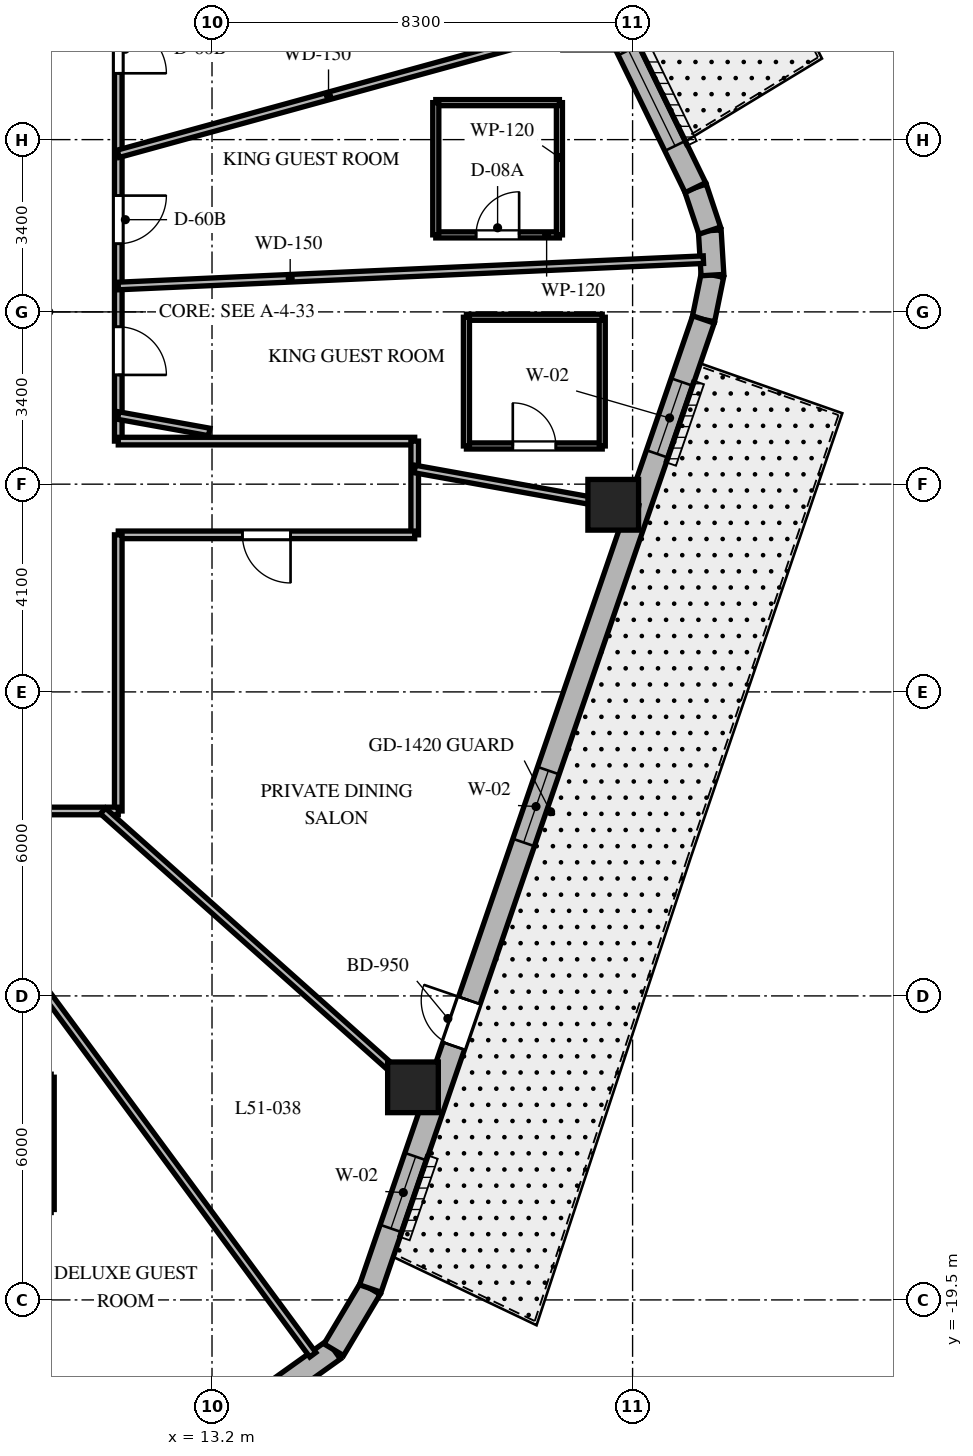
"""IFC4 building model, lengths in metres.
Left out: names, types, materials, properties, quantities, classifications, styles, units other than length and angle.
Written with IfcOpenShell. Run it as: python <this file> out.ifc"""

import sys

from ifc_helpers import new_model, si_unit, direction, frame, frame_2d, origin, origin_2d, place, context, subcontext, project, spatial, rectangle, extrude, element, fill, save


model = new_model("IFC4")
c1 = context("Model", 3, precision=1e-05, world=origin(), true_north=direction((0.0, 1.0)))
c2 = subcontext(c1, "Body", "Model", "MODEL_VIEW")
j1 = project(units=[si_unit("LENGTHUNIT", "METRE"), si_unit("PLANEANGLEUNIT", "RADIAN")], contexts=[c1])
p1 = place(None, origin())
s1 = spatial("IfcSite", under=j1, at=p1, CompositionType="ELEMENT")
p2 = place(p1, origin())
s2 = spatial("IfcBuilding", under=s1, at=p2, CompositionType="ELEMENT")
p3 = place(p2, frame((0.0, 0.0, 206.5)))
s3 = spatial("IfcBuildingStorey", under=s2, at=p3, CompositionType="ELEMENT", Elevation=206.5)
for number, where, z_axis, x_axis in (
    (1, (17.166, -15.304, 0.0), (0.0, 0.0, 1.0), (1.0, 0.0, 0.0)),
    (2, (21.118, -3.807, 0.0), (0.0, 0.0, 1.0), (1.0, 0.0, 0.0)),
):
    element("IfcColumn", number, at=place(p3, frame(where, z_axis=z_axis, x_axis=x_axis)), inside=s3, PredefinedType="COLUMN", context=c2, shape_type="SweptSolid", body=[
        extrude(rectangle(XDim=1.0, YDim=1.0, at=origin_2d()), origin(), (0.0, 0.0, 1.0), 3.8),
    ])
p4 = place(p3, frame((14.478, -21.287, 0.0), z_axis=(0.0, 0.0, 1.0), x_axis=(0.813888518617, 0.58102106611, 0.0)))
e3 = element("IfcWall", 3, at=p4, inside=s3, PredefinedType="SOLIDWALL", context=c2, shape_type="SweptSolid", body=[
    extrude(rectangle(XDim=1.383, YDim=0.45, at=frame_2d((0.691, 0.0))), origin(), (0.0, 0.0, 1.0), 3.5),
])
p5 = place(p3, frame((15.604, -20.483, 0.0), z_axis=(0.0, 0.0, 1.0), x_axis=(0.512222149036, 0.858852996756, 0.0)))
e4 = element("IfcWall", 4, at=p5, inside=s3, PredefinedType="SOLIDWALL", context=c2, shape_type="SweptSolid", body=[
    extrude(rectangle(XDim=1.406, YDim=0.45, at=frame_2d((0.703, 0.0))), origin(), (0.0, 0.0, 1.0), 3.5),
])
p6 = place(p3, frame((22.898, -0.15, 0.0), z_axis=(0.0, 0.0, 1.0), x_axis=(0.199055826889, 0.979988151858, 0.0)))
e5 = element("IfcWall", 5, at=p6, inside=s3, PredefinedType="SOLIDWALL", context=c2, shape_type="SweptSolid", body=[
    extrude(rectangle(XDim=0.894, YDim=0.45, at=frame_2d((0.447, 0.0))), origin(), (0.0, 0.0, 1.0), 3.5),
])
p7 = place(p3, frame((23.076, 0.727, 0.0), z_axis=(0.0, 0.0, 1.0), x_axis=(-0.060805222108, 0.998149650586, 0.0)))
e6 = element("IfcWall", 6, at=p7, inside=s3, PredefinedType="SOLIDWALL", context=c2, shape_type="SweptSolid", body=[
    extrude(rectangle(XDim=0.879, YDim=0.45, at=frame_2d((0.44, 0.0))), origin(), (0.0, 0.0, 1.0), 3.5),
])
p8 = place(p3, frame((23.023, 1.604, 0.0), z_axis=(0.0, 0.0, 1.0), x_axis=(-0.316801227695, 0.948491951537, 0.0)))
e7 = element("IfcWall", 7, at=p8, inside=s3, PredefinedType="SOLIDWALL", context=c2, shape_type="SweptSolid", body=[
    extrude(rectangle(XDim=0.894, YDim=0.45, at=frame_2d((0.447, 0.0))), origin(), (0.0, 0.0, 1.0), 3.5),
])
p9 = place(p3, frame((16.324, -19.275, 0.0), z_axis=(0.0, 0.0, 1.0), x_axis=(0.325083142304, 0.945685439557, 0.0)))
e8 = element("IfcWall", 8, at=p9, inside=s3, PredefinedType="SOLIDWALL", context=c2, shape_type="SweptSolid", body=[
    extrude(rectangle(XDim=20.224, YDim=0.45, at=frame_2d((10.112, 0.0))), origin(), (0.0, 0.0, 1.0), 3.5),
])
p10 = place(p9, frame((5.062, 0.0, 0.0)))
e9 = element("IfcOpeningElement", 9, at=p10, cuts=e8, PredefinedType="OPENING", context=c2, shape_type="SweptSolid", body=[
    extrude(rectangle(XDim=0.95, YDim=2.15, at=frame_2d((0.475, 1.075))), frame((0.0, 0.235, 0.0), z_axis=(0.0, -1.0, 0.0), x_axis=(1.0, 0.0, 0.0)), (0.0, 0.0, 1.0), 0.47),
])
p11 = place(p9, frame((1.253, 0.0, 0.8)))
e10 = element("IfcOpeningElement", 10, at=p11, cuts=e8, PredefinedType="OPENING", context=c2, shape_type="SweptSolid", body=[
    extrude(rectangle(XDim=1.5, YDim=1.8, at=frame_2d((0.75, 0.9))), frame((0.0, 0.235, 0.0), z_axis=(0.0, -1.0, 0.0), x_axis=(1.0, 0.0, 0.0)), (0.0, 0.0, 1.0), 0.47),
])
p12 = place(p9, frame((9.309, 0.0, 0.8)))
e11 = element("IfcOpeningElement", 11, at=p12, cuts=e8, PredefinedType="OPENING", context=c2, shape_type="SweptSolid", body=[
    extrude(rectangle(XDim=1.5, YDim=1.8, at=frame_2d((0.75, 0.9))), frame((0.0, 0.235, 0.0), z_axis=(0.0, -1.0, 0.0), x_axis=(1.0, 0.0, 0.0)), (0.0, 0.0, 1.0), 0.47),
])
p13 = place(p9, frame((17.418, 0.0, 0.8)))
e12 = element("IfcOpeningElement", 12, at=p13, cuts=e8, PredefinedType="OPENING", context=c2, shape_type="SweptSolid", body=[
    extrude(rectangle(XDim=1.5, YDim=1.8, at=frame_2d((0.75, 0.9))), frame((0.0, 0.235, 0.0), z_axis=(0.0, -1.0, 0.0), x_axis=(1.0, 0.0, 0.0)), (0.0, 0.0, 1.0), 0.47),
])
p14 = place(p3, frame((22.74, 2.452, 0.0), z_axis=(0.0, 0.0, 1.0), x_axis=(-0.437753424814, 0.899095066755, 0.0)))
e13 = element("IfcWall", 13, at=p14, inside=s3, PredefinedType="SOLIDWALL", context=c2, shape_type="SweptSolid", body=[
    extrude(rectangle(XDim=19.137, YDim=0.45, at=frame_2d((9.569, 0.0))), origin(), (0.0, 0.0, 1.0), 3.5),
])
p15 = place(p14, frame((4.763, 0.0, 0.0)))
e14 = element("IfcOpeningElement", 14, at=p15, cuts=e13, PredefinedType="OPENING", context=c2, shape_type="SweptSolid", body=[
    extrude(rectangle(XDim=1.0, YDim=2.15, at=frame_2d((0.5, 1.075))), frame((0.0, 0.235, 0.0), z_axis=(0.0, -1.0, 0.0), x_axis=(1.0, 0.0, 0.0)), (0.0, 0.0, 1.0), 0.47),
])
p16 = place(p14, frame((0.916, 0.0, 0.8)))
e15 = element("IfcOpeningElement", 15, at=p16, cuts=e13, PredefinedType="OPENING", context=c2, shape_type="SweptSolid", body=[
    extrude(rectangle(XDim=2.1, YDim=1.85, at=frame_2d((1.05, 0.925))), frame((0.0, 0.235, 0.0), z_axis=(0.0, -1.0, 0.0), x_axis=(1.0, 0.0, 0.0)), (0.0, 0.0, 1.0), 0.47),
])
p17 = place(p14, frame((6.851, 0.0, 0.8)))
e16 = element("IfcOpeningElement", 16, at=p17, cuts=e13, PredefinedType="OPENING", context=c2, shape_type="SweptSolid", body=[
    extrude(rectangle(XDim=2.1, YDim=1.85, at=frame_2d((1.05, 0.925))), frame((0.0, 0.235, 0.0), z_axis=(0.0, -1.0, 0.0), x_axis=(1.0, 0.0, 0.0)), (0.0, 0.0, 1.0), 0.47),
])
p18 = place(p14, frame((11.545, 0.0, 0.8)))
e17 = element("IfcOpeningElement", 17, at=p18, cuts=e13, PredefinedType="OPENING", context=c2, shape_type="SweptSolid", body=[
    extrude(rectangle(XDim=2.1, YDim=1.85, at=frame_2d((1.05, 0.925))), frame((0.0, 0.235, 0.0), z_axis=(0.0, -1.0, 0.0), x_axis=(1.0, 0.0, 0.0)), (0.0, 0.0, 1.0), 0.47),
])
p19 = place(p14, frame((16.173, 0.0, 0.8)))
e18 = element("IfcOpeningElement", 18, at=p19, cuts=e13, PredefinedType="OPENING", context=c2, shape_type="SweptSolid", body=[
    extrude(rectangle(XDim=2.1, YDim=1.85, at=frame_2d((1.05, 0.925))), frame((0.0, 0.235, 0.0), z_axis=(0.0, -1.0, 0.0), x_axis=(1.0, 0.0, 0.0)), (0.0, 0.0, 1.0), 0.47),
])
p20 = place(p3, frame((11.35, 9.85, 0.0), z_axis=(0.0, 0.0, 1.0), x_axis=(0.0, -1.0, 0.0)))
e19 = element("IfcWall", 19, at=p20, inside=s3, PredefinedType="PARTITIONING", context=c2, shape_type="SweptSolid", body=[
    extrude(rectangle(XDim=12.4, YDim=0.15, at=frame_2d((6.2, 0.0))), origin(), (0.0, 0.0, 1.0), 2.99),
])
p21 = place(p20, frame((7.555, 0.0, 0.0)))
e20 = element("IfcOpeningElement", 20, at=p21, cuts=e19, PredefinedType="OPENING", context=c2, shape_type="SweptSolid", body=[
    extrude(rectangle(XDim=0.95, YDim=2.03, at=frame_2d((0.475, 1.015))), frame((0.0, 0.085, 0.0), z_axis=(0.0, -1.0, 0.0), x_axis=(1.0, 0.0, 0.0)), (0.0, 0.0, 1.0), 0.17),
])
p22 = place(p20, frame((4.191, 0.0, 0.0)))
e21 = element("IfcOpeningElement", 21, at=p22, cuts=e19, PredefinedType="OPENING", context=c2, shape_type="SweptSolid", body=[
    extrude(rectangle(XDim=0.95, YDim=2.03, at=frame_2d((0.475, 1.015))), frame((0.0, 0.085, 0.0), z_axis=(0.0, -1.0, 0.0), x_axis=(1.0, 0.0, 0.0)), (0.0, 0.0, 1.0), 0.17),
])
p23 = place(p20, frame((0.994, 0.0, 0.0)))
e22 = element("IfcOpeningElement", 22, at=p23, cuts=e19, PredefinedType="OPENING", context=c2, shape_type="SweptSolid", body=[
    extrude(rectangle(XDim=0.9, YDim=2.03, at=frame_2d((0.45, 1.015))), frame((0.0, 0.085, 0.0), z_axis=(0.0, -1.0, 0.0), x_axis=(1.0, 0.0, 0.0)), (0.0, 0.0, 1.0), 0.17),
])
p24 = place(p20, frame((10.144, 0.0, 0.0)))
e23 = element("IfcOpeningElement", 23, at=p24, cuts=e19, PredefinedType="OPENING", context=c2, shape_type="SweptSolid", body=[
    extrude(rectangle(XDim=0.95, YDim=2.03, at=frame_2d((0.475, 1.015))), frame((0.0, 0.085, 0.0), z_axis=(0.0, -1.0, 0.0), x_axis=(1.0, 0.0, 0.0)), (0.0, 0.0, 1.0), 0.17),
])
p25 = place(p3, frame((11.35, -2.55, 0.0), z_axis=(0.0, 0.0, 1.0), x_axis=(1.0, 0.0, 0.0)))
e24 = element("IfcWall", 24, at=p25, inside=s3, PredefinedType="PARTITIONING", context=c2, shape_type="SweptSolid", body=[
    extrude(rectangle(XDim=5.85, YDim=0.15, at=frame_2d((2.925, 0.0))), origin(), (0.0, 0.0, 1.0), 2.94),
])
p26 = place(p3, frame((17.2, -2.55, 0.0), z_axis=(0.0, 0.0, 1.0), x_axis=(0.0, -1.0, 0.0)))
e25 = element("IfcWall", 25, at=p26, inside=s3, PredefinedType="PARTITIONING", context=c2, shape_type="SweptSolid", body=[
    extrude(rectangle(XDim=1.85, YDim=0.15, at=frame_2d((0.925, 0.0))), origin(), (0.0, 0.0, 1.0), 2.94),
])
p27 = place(p3, frame((17.2, -4.4, 0.0), z_axis=(0.0, 0.0, 1.0), x_axis=(-1.0, 0.0, 0.0)))
e26 = element("IfcWall", 26, at=p27, inside=s3, PredefinedType="PARTITIONING", context=c2, shape_type="SweptSolid", body=[
    extrude(rectangle(XDim=5.85, YDim=0.15, at=frame_2d((2.925, 0.0))), origin(), (0.0, 0.0, 1.0), 2.94),
])
p28 = place(p27, frame((2.45, 0.0, 0.0)))
e27 = element("IfcOpeningElement", 27, at=p28, cuts=e26, PredefinedType="OPENING", context=c2, shape_type="SweptSolid", body=[
    extrude(rectangle(XDim=0.95, YDim=2.03, at=frame_2d((0.475, 1.015))), frame((0.0, 0.085, 0.0), z_axis=(0.0, -1.0, 0.0), x_axis=(1.0, 0.0, 0.0)), (0.0, 0.0, 1.0), 0.17),
])
p29 = place(p3, frame((11.35, -4.4, 0.0), z_axis=(0.0, 0.0, 1.0), x_axis=(0.0, -1.0, 0.0)))
e28 = element("IfcWall", 28, at=p29, inside=s3, PredefinedType="PARTITIONING", context=c2, shape_type="SweptSolid", body=[
    extrude(rectangle(XDim=5.45, YDim=0.15, at=frame_2d((2.725, 0.0))), origin(), (0.0, 0.0, 1.0), 2.99),
])
p30 = place(p3, frame((11.35, -9.85, 0.0), z_axis=(0.0, 0.0, 1.0), x_axis=(-1.0, 0.0, 0.0)))
e29 = element("IfcWall", 29, at=p30, inside=s3, PredefinedType="PARTITIONING", context=c2, shape_type="SweptSolid", body=[
    extrude(rectangle(XDim=10.43, YDim=0.15, at=frame_2d((5.215, 0.0))), origin(), (0.0, 0.0, 1.0), 2.99),
])
p31 = place(p30, frame((8.387, 0.0, 0.0)))
e30 = element("IfcOpeningElement", 30, at=p31, cuts=e29, PredefinedType="OPENING", context=c2, shape_type="SweptSolid", body=[
    extrude(rectangle(XDim=0.9, YDim=2.03, at=frame_2d((0.45, 1.015))), frame((0.0, 0.085, 0.0), z_axis=(0.0, -1.0, 0.0), x_axis=(1.0, 0.0, 0.0)), (0.0, 0.0, 1.0), 0.17),
])
p32 = place(p30, frame((5.287, 0.0, 0.0)))
e31 = element("IfcOpeningElement", 31, at=p32, cuts=e29, PredefinedType="OPENING", context=c2, shape_type="SweptSolid", body=[
    extrude(rectangle(XDim=0.95, YDim=2.03, at=frame_2d((0.475, 1.015))), frame((0.0, 0.085, 0.0), z_axis=(0.0, -1.0, 0.0), x_axis=(1.0, 0.0, 0.0)), (0.0, 0.0, 1.0), 0.17),
])
p33 = place(p30, frame((1.71, 0.0, 0.0)))
e32 = element("IfcOpeningElement", 32, at=p33, cuts=e29, PredefinedType="OPENING", context=c2, shape_type="SweptSolid", body=[
    extrude(rectangle(XDim=0.9, YDim=2.03, at=frame_2d((0.45, 1.015))), frame((0.0, 0.085, 0.0), z_axis=(0.0, -1.0, 0.0), x_axis=(1.0, 0.0, 0.0)), (0.0, 0.0, 1.0), 0.17),
])
p34 = place(p3, frame((11.35, 0.511, 0.0), z_axis=(0.0, 0.0, 1.0), x_axis=(0.998988518139, 0.044965994104, 0.0)))
e33 = element("IfcWall", 33, at=p34, inside=s3, PredefinedType="PARTITIONING", context=c2, shape_type="SweptSolid", body=[
    extrude(rectangle(XDim=11.559, YDim=0.15, at=frame_2d((5.78, 0.0))), origin(), (0.0, 0.0, 1.0), 2.74),
])
p35 = place(p3, frame((11.35, 3.121, 0.0), z_axis=(0.0, 0.0, 1.0), x_axis=(0.964212793822, 0.265129568758, 0.0)))
e34 = element("IfcWall", 34, at=p35, inside=s3, PredefinedType="PARTITIONING", context=c2, shape_type="SweptSolid", body=[
    extrude(rectangle(XDim=10.12, YDim=0.15, at=frame_2d((5.06, 0.0))), origin(), (0.0, 0.0, 1.0), 2.74),
])
p36 = place(p3, frame((7.269, -9.85, 0.0), z_axis=(0.0, 0.0, 1.0), x_axis=(0.593814492791, -0.8046019812, 0.0)))
e35 = element("IfcWall", 35, at=p36, inside=s3, PredefinedType="PARTITIONING", context=c2, shape_type="SweptSolid", body=[
    extrude(rectangle(XDim=13.338, YDim=0.15, at=frame_2d((6.669, 0.0))), origin(), (0.0, 0.0, 1.0), 2.74),
])
p37 = place(p3, frame((11.048, -9.85, 0.0), z_axis=(0.0, 0.0, 1.0), x_axis=(0.746444434655, -0.665447748492, 0.0)))
e36 = element("IfcWall", 36, at=p37, inside=s3, PredefinedType="PARTITIONING", context=c2, shape_type="SweptSolid", body=[
    extrude(rectangle(XDim=8.732, YDim=0.15, at=frame_2d((4.366, 0.0))), origin(), (0.0, 0.0, 1.0), 2.74),
])
p38 = place(p3, frame((11.35, -2.046, 0.0), z_axis=(0.0, 0.0, 1.0), x_axis=(0.984127783205, -0.177461281195, 0.0)))
e37 = element("IfcWall", 37, at=p38, inside=s3, PredefinedType="PARTITIONING", context=c2, shape_type="SweptSolid", body=[
    extrude(rectangle(XDim=1.826, YDim=0.15, at=frame_2d((0.913, 0.0))), origin(), (0.0, 0.0, 1.0), 3.5),
])
p39 = place(p3, frame((17.2, -3.101, 0.0), z_axis=(0.0, 0.0, 1.0), x_axis=(0.98413465883, -0.177423147559, 0.0)))
e38 = element("IfcWall", 38, at=p39, inside=s3, PredefinedType="PARTITIONING", context=c2, shape_type="SweptSolid", body=[
    extrude(rectangle(XDim=4.482, YDim=0.15, at=frame_2d((2.241, 0.0))), origin(), (0.0, 0.0, 1.0), 2.74),
])
p40 = place(p3, frame((17.616, 1.52, 0.0), z_axis=(0.0, 0.0, 1.0), x_axis=(1.0, 0.0, 0.0)))
e39 = element("IfcWall", 39, at=p40, inside=s3, PredefinedType="PARTITIONING", context=c2, shape_type="SweptSolid", body=[
    extrude(rectangle(XDim=2.44, YDim=0.12, at=frame_2d((1.22, 0.0))), origin(), (0.0, 0.0, 1.0), 3.5),
])
p41 = place(p40, frame((0.795, 0.0, 0.0)))
e40 = element("IfcOpeningElement", 40, at=p41, cuts=e39, PredefinedType="OPENING", context=c2, shape_type="SweptSolid", body=[
    extrude(rectangle(XDim=0.85, YDim=2.03, at=frame_2d((0.425, 1.015))), frame((0.0, 0.07, 0.0), z_axis=(0.0, -1.0, 0.0), x_axis=(1.0, 0.0, 0.0)), (0.0, 0.0, 1.0), 0.14),
])
p42 = place(p3, frame((20.056, 1.52, 0.0), z_axis=(0.0, 0.0, 1.0), x_axis=(0.0, 1.0, 0.0)))
e41 = element("IfcWall", 41, at=p42, inside=s3, PredefinedType="PARTITIONING", context=c2, shape_type="SweptSolid", body=[
    extrude(rectangle(XDim=2.61, YDim=0.12, at=frame_2d((1.305, 0.0))), origin(), (0.0, 0.0, 1.0), 3.5),
])
p43 = place(p3, frame((20.056, 4.13, 0.0), z_axis=(0.0, 0.0, 1.0), x_axis=(-1.0, 0.0, 0.0)))
e42 = element("IfcWall", 42, at=p43, inside=s3, PredefinedType="PARTITIONING", context=c2, shape_type="SweptSolid", body=[
    extrude(rectangle(XDim=2.44, YDim=0.12, at=frame_2d((1.22, 0.0))), origin(), (0.0, 0.0, 1.0), 3.5),
])
p44 = place(p3, frame((17.616, 4.13, 0.0), z_axis=(0.0, 0.0, 1.0), x_axis=(0.0, -1.0, 0.0)))
e43 = element("IfcWall", 43, at=p44, inside=s3, PredefinedType="PARTITIONING", context=c2, shape_type="SweptSolid", body=[
    extrude(rectangle(XDim=2.61, YDim=0.12, at=frame_2d((1.305, 0.0))), origin(), (0.0, 0.0, 1.0), 3.5),
])
p45 = place(p3, frame((10.026, -17.715, 0.0), z_axis=(0.0, 0.0, 1.0), x_axis=(0.0, 1.0, 0.0)))
e44 = element("IfcWall", 44, at=p45, inside=s3, PredefinedType="PARTITIONING", context=c2, shape_type="SweptSolid", body=[
    extrude(rectangle(XDim=2.61, YDim=0.12, at=frame_2d((1.305, 0.0))), origin(), (0.0, 0.0, 1.0), 3.027),
])
p46 = place(p3, frame((18.221, -2.646, 0.0), z_axis=(0.0, 0.0, 1.0), x_axis=(1.0, 0.0, 0.0)))
e45 = element("IfcWall", 45, at=p46, inside=s3, PredefinedType="PARTITIONING", context=c2, shape_type="SweptSolid", body=[
    extrude(rectangle(XDim=2.68, YDim=0.12, at=frame_2d((1.34, 0.0))), origin(), (0.0, 0.0, 1.0), 2.74),
])
p47 = place(p46, frame((0.915, 0.0, 0.0)))
e46 = element("IfcOpeningElement", 46, at=p47, cuts=e45, PredefinedType="OPENING", context=c2, shape_type="SweptSolid", body=[
    extrude(rectangle(XDim=0.85, YDim=2.03, at=frame_2d((0.425, 1.015))), frame((0.0, 0.07, 0.0), z_axis=(0.0, -1.0, 0.0), x_axis=(1.0, 0.0, 0.0)), (0.0, 0.0, 1.0), 0.14),
])
p48 = place(p3, frame((20.901, -2.646, 0.0), z_axis=(0.0, 0.0, 1.0), x_axis=(0.0, 1.0, 0.0)))
e47 = element("IfcWall", 47, at=p48, inside=s3, PredefinedType="PARTITIONING", context=c2, shape_type="SweptSolid", body=[
    extrude(rectangle(XDim=2.54, YDim=0.12, at=frame_2d((1.27, 0.0))), origin(), (0.0, 0.0, 1.0), 2.74),
])
p49 = place(p3, frame((20.901, -0.106, 0.0), z_axis=(0.0, 0.0, 1.0), x_axis=(-1.0, 0.0, 0.0)))
e48 = element("IfcWall", 48, at=p49, inside=s3, PredefinedType="PARTITIONING", context=c2, shape_type="SweptSolid", body=[
    extrude(rectangle(XDim=2.68, YDim=0.12, at=frame_2d((1.34, 0.0))), origin(), (0.0, 0.0, 1.0), 2.74),
])
p50 = place(p3, frame((18.221, -0.106, 0.0), z_axis=(0.0, 0.0, 1.0), x_axis=(0.0, -1.0, 0.0)))
e49 = element("IfcWall", 49, at=p50, inside=s3, PredefinedType="PARTITIONING", context=c2, shape_type="SweptSolid", body=[
    extrude(rectangle(XDim=2.54, YDim=0.12, at=frame_2d((1.27, 0.0))), origin(), (0.0, 0.0, 1.0), 3.5),
])
p51 = place(p10, origin())
e50 = element("IfcDoor", 50, at=p51, inside=s3, OperationType="SINGLE_SWING_RIGHT", PredefinedType="DOOR", context=c2, shape_type="SweptSolid", body=[
    extrude(rectangle(XDim=0.95, YDim=2.15, at=frame_2d((0.475, 1.075))), frame((0.0, 0.025, 0.0), z_axis=(0.0, -1.0, 0.0), x_axis=(1.0, 0.0, 0.0)), (0.0, 0.0, 1.0), 0.05),
])
fill(e9, e50)
p52 = place(p11, origin())
e51 = element("IfcWindow", 51, at=p52, inside=s3, PartitioningType="SINGLE_PANEL", PredefinedType="WINDOW", context=c2, shape_type="SweptSolid", body=[
    extrude(rectangle(XDim=1.5, YDim=1.8, at=frame_2d((0.75, 0.9))), frame((0.0, 0.03, 0.0), z_axis=(0.0, -1.0, 0.0), x_axis=(1.0, 0.0, 0.0)), (0.0, 0.0, 1.0), 0.06),
])
fill(e10, e51)
p53 = place(p12, origin())
e52 = element("IfcWindow", 52, at=p53, inside=s3, PartitioningType="SINGLE_PANEL", PredefinedType="WINDOW", context=c2, shape_type="SweptSolid", body=[
    extrude(rectangle(XDim=1.5, YDim=1.8, at=frame_2d((0.75, 0.9))), frame((0.0, 0.03, 0.0), z_axis=(0.0, -1.0, 0.0), x_axis=(1.0, 0.0, 0.0)), (0.0, 0.0, 1.0), 0.06),
])
fill(e11, e52)
p54 = place(p13, origin())
e53 = element("IfcWindow", 53, at=p54, inside=s3, PartitioningType="SINGLE_PANEL", PredefinedType="WINDOW", context=c2, shape_type="SweptSolid", body=[
    extrude(rectangle(XDim=1.5, YDim=1.8, at=frame_2d((0.75, 0.9))), frame((0.0, 0.03, 0.0), z_axis=(0.0, -1.0, 0.0), x_axis=(1.0, 0.0, 0.0)), (0.0, 0.0, 1.0), 0.06),
])
fill(e12, e53)
p55 = place(p16, origin())
e54 = element("IfcWindow", 54, at=p55, inside=s3, PartitioningType="SINGLE_PANEL", PredefinedType="WINDOW", context=c2, shape_type="SweptSolid", body=[
    extrude(rectangle(XDim=2.1, YDim=1.85, at=frame_2d((1.05, 0.925))), frame((0.0, 0.03, 0.0), z_axis=(0.0, -1.0, 0.0), x_axis=(1.0, 0.0, 0.0)), (0.0, 0.0, 1.0), 0.06),
])
fill(e15, e54)
p56 = place(p21, origin())
e55 = element("IfcDoor", 55, at=p56, inside=s3, OperationType="SINGLE_SWING_LEFT", PredefinedType="DOOR", context=c2, shape_type="SweptSolid", body=[
    extrude(rectangle(XDim=0.95, YDim=2.03, at=frame_2d((0.475, 1.015))), frame((0.0, 0.025, 0.0), z_axis=(0.0, -1.0, 0.0), x_axis=(1.0, 0.0, 0.0)), (0.0, 0.0, 1.0), 0.05),
])
fill(e20, e55)
p57 = place(p41, origin())
e56 = element("IfcDoor", 56, at=p57, inside=s3, OperationType="SINGLE_SWING_RIGHT", PredefinedType="DOOR", context=c2, shape_type="SweptSolid", body=[
    extrude(rectangle(XDim=0.85, YDim=2.03, at=frame_2d((0.425, 1.015))), frame((0.0, 0.025, 0.0), z_axis=(0.0, -1.0, 0.0), x_axis=(1.0, 0.0, 0.0)), (0.0, 0.0, 1.0), 0.05),
])
fill(e40, e56)
p58 = place(p22, origin())
e57 = element("IfcDoor", 57, at=p58, inside=s3, OperationType="SINGLE_SWING_RIGHT", PredefinedType="DOOR", context=c2, shape_type="SweptSolid", body=[
    extrude(rectangle(XDim=0.95, YDim=2.03, at=frame_2d((0.475, 1.015))), frame((0.0, 0.025, 0.0), z_axis=(0.0, -1.0, 0.0), x_axis=(1.0, 0.0, 0.0)), (0.0, 0.0, 1.0), 0.05),
])
fill(e21, e57)
p59 = place(p28, origin())
e58 = element("IfcDoor", 58, at=p59, inside=s3, OperationType="SINGLE_SWING_LEFT", PredefinedType="DOOR", context=c2, shape_type="SweptSolid", body=[
    extrude(rectangle(XDim=0.95, YDim=2.03, at=frame_2d((0.475, 1.015))), frame((0.0, 0.025, 0.0), z_axis=(0.0, -1.0, 0.0), x_axis=(1.0, 0.0, 0.0)), (0.0, 0.0, 1.0), 0.05),
])
fill(e27, e58)
p60 = place(p24, origin())
e59 = element("IfcDoor", 59, at=p60, inside=s3, OperationType="SINGLE_SWING_RIGHT", PredefinedType="DOOR", context=c2, shape_type="SweptSolid", body=[
    extrude(rectangle(XDim=0.95, YDim=2.03, at=frame_2d((0.475, 1.015))), frame((0.0, 0.025, 0.0), z_axis=(0.0, -1.0, 0.0), x_axis=(1.0, 0.0, 0.0)), (0.0, 0.0, 1.0), 0.05),
])
fill(e23, e59)
p61 = place(p47, origin())
e60 = element("IfcDoor", 60, at=p61, inside=s3, OperationType="SINGLE_SWING_LEFT", PredefinedType="DOOR", context=c2, shape_type="SweptSolid", body=[
    extrude(rectangle(XDim=0.85, YDim=2.03, at=frame_2d((0.425, 1.015))), frame((0.0, 0.025, 0.0), z_axis=(0.0, -1.0, 0.0), x_axis=(1.0, 0.0, 0.0)), (0.0, 0.0, 1.0), 0.05),
])
fill(e46, e60)
save(model, sys.argv[1])
